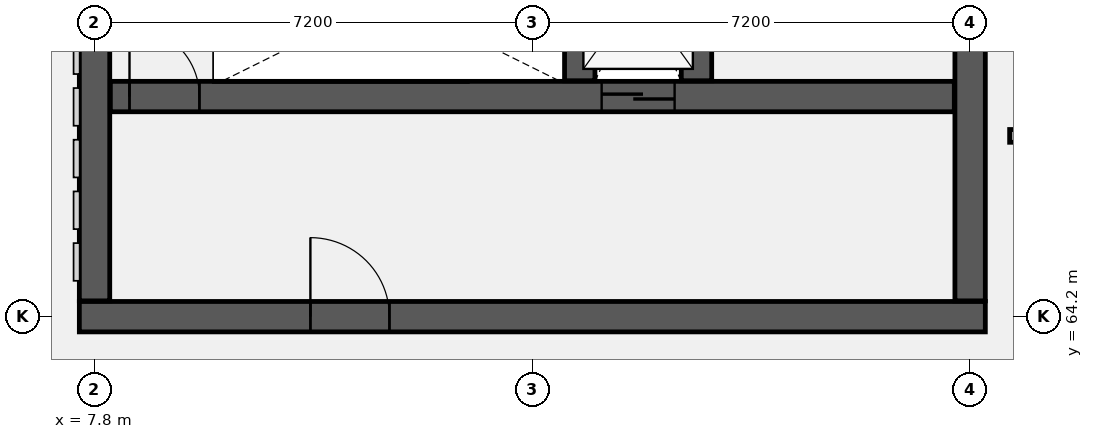
"""IFC4 building model, lengths in metres.
Left out: names, types, materials, properties, quantities, classifications, styles, units other than length and angle.
Written with IfcOpenShell. Run it as: python <this file> out.ifc"""

import sys

from ifc_helpers import new_model, si_unit, direction, frame, frame_2d, origin, place, context, subcontext, project, spatial, rectangle, extrude, element, fill, save


model = new_model("IFC4")
c1 = context("Model", 3, precision=1e-05, world=origin(), true_north=direction((0.0, 1.0)))
c2 = subcontext(c1, "Body", "Model", "MODEL_VIEW")
j1 = project(units=[si_unit("LENGTHUNIT", "METRE"), si_unit("PLANEANGLEUNIT", "RADIAN")], contexts=[c1])
p1 = place(None, origin())
s1 = spatial("IfcSite", under=j1, at=p1, CompositionType="ELEMENT")
p2 = place(p1, origin())
s2 = spatial("IfcBuilding", under=s1, at=p2, CompositionType="ELEMENT")
p3 = place(p2, origin())
s3 = spatial("IfcBuildingStorey", under=s2, at=p3, CompositionType="ELEMENT", Elevation=0.0)
p4 = place(p3, frame((7.55, 64.2, 0.0), z_axis=(0.0, 0.0, 1.0), x_axis=(1.0, 0.0, 0.0)))
e1 = element("IfcWall", 1, at=p4, inside=s3, PredefinedType="SHEAR", context=c2, shape_type="SweptSolid", body=[
    extrude(rectangle(XDim=14.9, YDim=0.5, at=frame_2d((7.45, 0.0))), origin(), (0.0, 0.0, 1.0), 5.4),
])
p5 = place(p4, frame((3.8, 0.0, 0.0)))
e2 = element("IfcOpeningElement", 2, at=p5, cuts=e1, PredefinedType="OPENING", context=c2, shape_type="SweptSolid", body=[
    extrude(rectangle(XDim=1.3, YDim=2.2, at=frame_2d((0.65, 1.1))), frame((0.0, 0.26, 0.0), z_axis=(0.0, -1.0, 0.0), x_axis=(1.0, 0.0, 0.0)), (0.0, 0.0, 1.0), 0.52),
])
for number, where, z_axis, x_axis in (
    (3, (7.8, 64.46, 0.0), (0.0, 0.0, 1.0), (0.0, 1.0, 0.0)),
    (4, (22.2, 64.46, 0.0), (0.0, 0.0, 1.0), (0.0, 1.0, 0.0)),
):
    element("IfcWall", number, at=place(p3, frame(where, z_axis=z_axis, x_axis=x_axis)), inside=s3, PredefinedType="SHEAR", context=c2, shape_type="SweptSolid", body=[
        extrude(rectangle(XDim=6.68, YDim=0.5, at=frame_2d((3.34, 0.0))), origin(), (0.0, 0.0, 1.0), 5.4),
    ])
p6 = place(p3, frame((8.06, 67.82, 0.0), z_axis=(0.0, 0.0, 1.0), x_axis=(1.0, 0.0, 0.0)))
e5 = element("IfcWall", 5, at=p6, inside=s3, PredefinedType="SHEAR", context=c2, shape_type="SweptSolid", body=[
    extrude(rectangle(XDim=13.88, YDim=0.5, at=frame_2d((6.94, 0.0))), origin(), (0.0, 0.0, 1.0), 5.4),
])
p7 = place(p6, frame((8.08, 0.0, 0.0)))
e6 = element("IfcOpeningElement", 6, at=p7, cuts=e5, PredefinedType="OPENING", context=c2, shape_type="SweptSolid", body=[
    extrude(rectangle(XDim=1.2, YDim=2.15, at=frame_2d((0.6, 1.075))), frame((0.0, 0.26, 0.0), z_axis=(0.0, -1.0, 0.0), x_axis=(1.0, 0.0, 0.0)), (0.0, 0.0, 1.0), 0.52),
])
p8 = place(p6, frame((0.315, 0.0, 0.0)))
e7 = element("IfcOpeningElement", 7, at=p8, cuts=e5, PredefinedType="OPENING", context=c2, shape_type="SweptSolid", body=[
    extrude(rectangle(XDim=1.15, YDim=2.15, at=frame_2d((0.575, 1.075))), frame((0.0, 0.26, 0.0), z_axis=(0.0, -1.0, 0.0), x_axis=(1.0, 0.0, 0.0)), (0.0, 0.0, 1.0), 0.52),
])
for number, where, z_axis, x_axis in (
    (8, (15.78, 68.08, 0.0), (0.0, 0.0, 1.0), (0.0, 1.0, 0.0)),
    (9, (17.7, 68.08, 0.0), (0.0, 0.0, 1.0), (0.0, 1.0, 0.0)),
):
    element("IfcWall", number, at=place(p3, frame(where, z_axis=z_axis, x_axis=x_axis)), inside=s3, PredefinedType="SHEAR", context=c2, shape_type="SweptSolid", body=[
        extrude(rectangle(XDim=3.06, YDim=0.5, at=frame_2d((1.53, 0.0))), origin(), (0.0, 0.0, 1.0), 5.4),
    ])
p9 = place(p3, frame((22.85, 67.173, 0.0), z_axis=(0.0, 0.0, 1.0), x_axis=(1.0, 0.0, 0.0)))
e10 = element("IfcWall", 10, at=p9, inside=s3, PredefinedType="PARTITIONING", context=c2, shape_type="SweptSolid", body=[
    extrude(rectangle(XDim=3.51, YDim=0.21, at=frame_2d((1.755, 0.0))), origin(), (0.0, 0.0, 1.0), 5.12),
])
p10 = place(p7, frame((1.2, 0.0, 0.0), z_axis=(0.0, 0.0, 1.0), x_axis=(-1.0, 0.0, 0.0)))
e11 = element("IfcDoor", 11, at=p10, inside=s3, OperationType="DOUBLE_DOOR_SLIDING", PredefinedType="DOOR", context=c2, shape_type="SweptSolid", body=[
    extrude(rectangle(XDim=1.2, YDim=2.15, at=frame_2d((0.6, 1.075))), frame((0.0, 0.025, 0.0), z_axis=(0.0, -1.0, 0.0), x_axis=(1.0, 0.0, 0.0)), (0.0, 0.0, 1.0), 0.05),
])
fill(e6, e11)
p11 = place(p8, origin())
e12 = element("IfcDoor", 12, at=p11, inside=s3, OperationType="SINGLE_SWING_LEFT", PredefinedType="DOOR", context=c2, shape_type="SweptSolid", body=[
    extrude(rectangle(XDim=1.15, YDim=2.15, at=frame_2d((0.575, 1.075))), frame((0.0, 0.025, 0.0), z_axis=(0.0, -1.0, 0.0), x_axis=(1.0, 0.0, 0.0)), (0.0, 0.0, 1.0), 0.05),
])
fill(e7, e12)
p12 = place(p5, frame((1.3, 0.0, 0.0), z_axis=(0.0, 0.0, 1.0), x_axis=(-1.0, 0.0, 0.0)))
e13 = element("IfcDoor", 13, at=p12, inside=s3, OperationType="SINGLE_SWING_LEFT", PredefinedType="DOOR", context=c2, shape_type="SweptSolid", body=[
    extrude(rectangle(XDim=1.3, YDim=2.2, at=frame_2d((0.65, 1.1))), frame((0.0, 0.025, 0.0), z_axis=(0.0, -1.0, 0.0), x_axis=(1.0, 0.0, 0.0)), (0.0, 0.0, 1.0), 0.05),
])
fill(e2, e13)
save(model, sys.argv[1])
